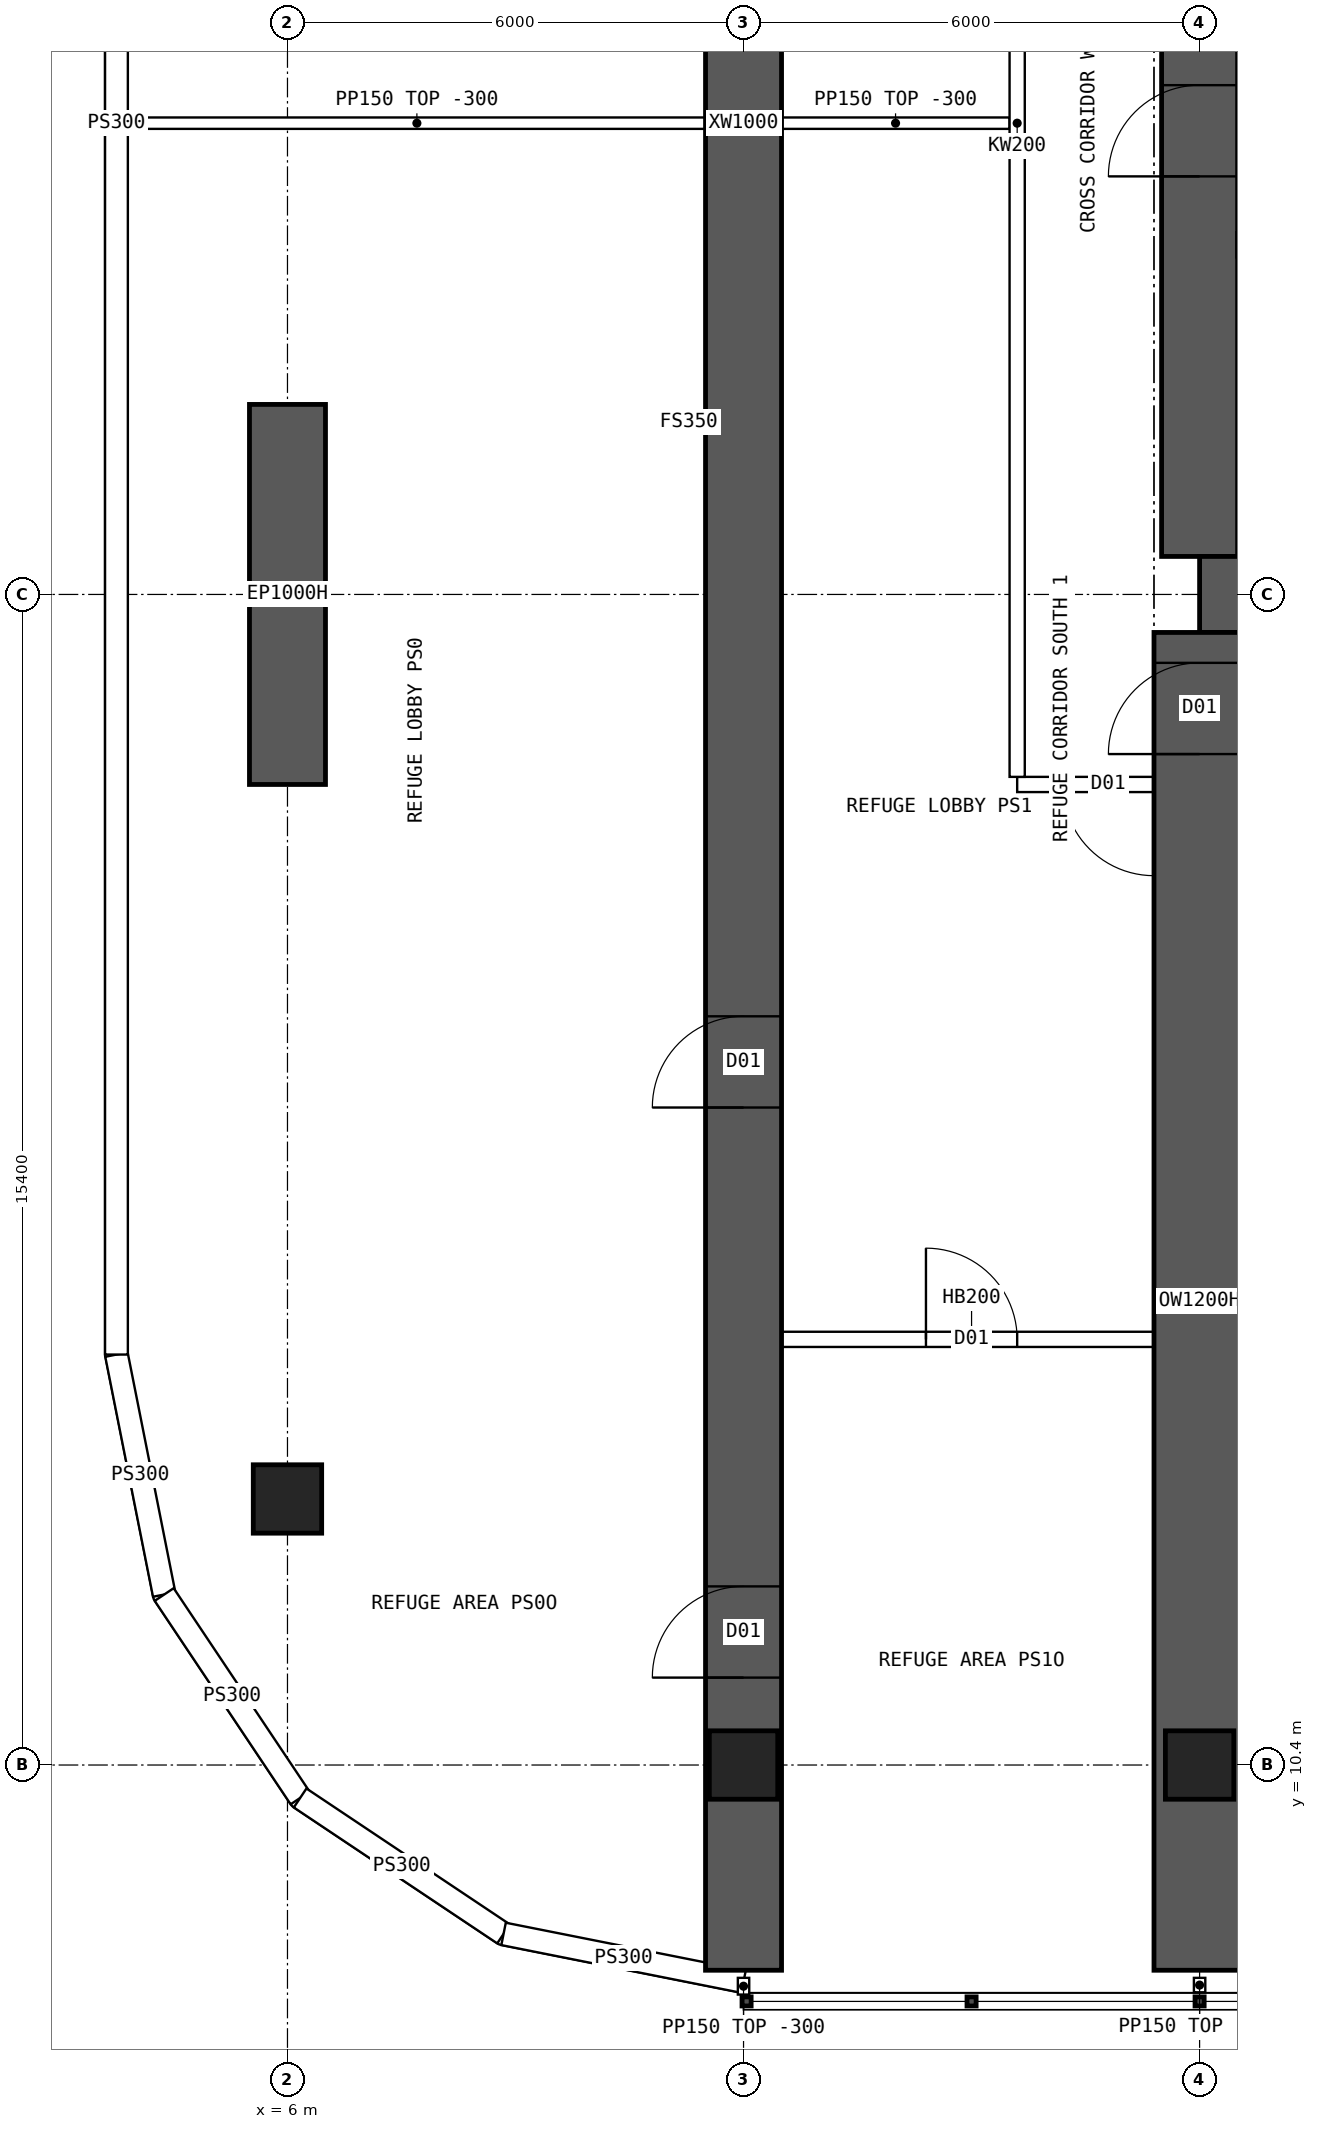
"""IFC4 building model, lengths in metres.
Left out: names, types, materials, properties, quantities, classifications, styles, units other than length and angle.
Written with IfcOpenShell. Run it as: python <this file> out.ifc"""

import sys

from ifc_helpers import new_model, si_unit, direction, frame, frame_2d, origin, origin_2d, place, context, subcontext, project, spatial, polyline, rectangle, hollow_rectangle, outline, extrude, element, fill, save


model = new_model("IFC4")
c1 = context("Model", 3, precision=1e-05, world=origin(), true_north=direction((0.0, 1.0)))
c2 = subcontext(c1, "Body", "Model", "MODEL_VIEW")
j1 = project(units=[si_unit("LENGTHUNIT", "METRE"), si_unit("PLANEANGLEUNIT", "RADIAN")], contexts=[c1])
p1 = place(None, origin())
s1 = spatial("IfcSite", under=j1, at=p1, CompositionType="ELEMENT")
p2 = place(p1, origin())
s2 = spatial("IfcBuilding", under=s1, at=p2, CompositionType="ELEMENT")
p3 = place(p2, frame((0.0, 0.0, 68.95)))
s3 = spatial("IfcBuildingStorey", under=s2, at=p3, CompositionType="ELEMENT", Elevation=68.95)
for number, where, z_axis, x_axis in (
    (1, (12.0, 10.4, 0.0), (0.0, 0.0, 1.0), (1.0, 0.0, 0.0)),
    (2, (18.0, 10.4, 0.0), (0.0, 0.0, 1.0), (1.0, 0.0, 0.0)),
    (3, (6.0, 13.9, 0.0), (0.0, 0.0, 1.0), (1.0, 0.0, 0.0)),
):
    element("IfcColumn", number, at=place(p3, frame(where, z_axis=z_axis, x_axis=x_axis)), inside=s3, PredefinedType="COLUMN", context=c2, shape_type="SweptSolid", body=[
        extrude(hollow_rectangle(XDim=0.9, YDim=0.9, WallThickness=0.09, at=origin_2d()), origin(), (0.0, 0.0, 1.0), 7.2),
    ])
p4 = place(p3, frame((6.0, 23.3, 0.0), z_axis=(0.0, 0.0, 1.0), x_axis=(0.0, 1.0, 0.0)))
e4 = element("IfcWall", 4, at=p4, inside=s3, PredefinedType="SHEAR", context=c2, shape_type="SweptSolid", body=[
    extrude(rectangle(XDim=5.0, YDim=1.0, at=frame_2d((2.5, 0.0))), origin(), (0.0, 0.0, 1.0), 7.2),
])
p5 = place(p3, frame((18.0, 25.8, 0.0), z_axis=(0.0, 0.0, 1.0), x_axis=(1.0, 0.0, 0.0)))
e5 = element("IfcWall", 5, at=p5, inside=s3, PredefinedType="SHEAR", context=c2, shape_type="SweptSolid", body=[
    extrude(rectangle(XDim=48.0, YDim=1.0, at=frame_2d((24.0, 0.0))), origin(), (0.0, 0.0, 1.0), 7.2),
])
p6 = place(p3, frame((18.0, 26.3, 0.0), z_axis=(0.0, 0.0, 1.0), x_axis=(0.0, 1.0, 0.0)))
e6 = element("IfcWall", 6, at=p6, inside=s3, PredefinedType="SHEAR", context=c2, shape_type="SweptSolid", body=[
    extrude(rectangle(XDim=11.4, YDim=1.0, at=frame_2d((5.7, 0.0))), origin(), (0.0, 0.0, 1.0), 7.2),
])
p7 = place(p6, frame((5.0, 0.0, 0.0)))
e7 = element("IfcOpeningElement", 7, at=p7, cuts=e6, PredefinedType="OPENING", context=c2, shape_type="SweptSolid", body=[
    extrude(rectangle(XDim=1.2, YDim=2.1, at=frame_2d((0.6, 1.05))), frame((0.0, 0.51, 0.0), z_axis=(0.0, -1.0, 0.0), x_axis=(1.0, 0.0, 0.0)), (0.0, 0.0, 1.0), 1.02),
])
p8 = place(p3, frame((12.0, 7.7, 0.0), z_axis=(0.0, 0.0, 1.0), x_axis=(0.0, 1.0, 0.0)))
e8 = element("IfcWall", 8, at=p8, inside=s3, PredefinedType="SHEAR", context=c2, shape_type="SweptSolid", body=[
    extrude(rectangle(XDim=48.6, YDim=1.0, at=frame_2d((24.3, 0.0))), origin(), (0.0, 0.0, 1.0), 7.2),
])
p9 = place(p8, frame((3.85, 0.0, 0.0)))
e9 = element("IfcOpeningElement", 9, at=p9, cuts=e8, PredefinedType="OPENING", context=c2, shape_type="SweptSolid", body=[
    extrude(rectangle(XDim=1.2, YDim=2.1, at=frame_2d((0.6, 1.05))), frame((0.0, 0.51, 0.0), z_axis=(0.0, -1.0, 0.0), x_axis=(1.0, 0.0, 0.0)), (0.0, 0.0, 1.0), 1.02),
])
p10 = place(p8, frame((11.35, 0.0, 0.0)))
e10 = element("IfcOpeningElement", 10, at=p10, cuts=e8, PredefinedType="OPENING", context=c2, shape_type="SweptSolid", body=[
    extrude(rectangle(XDim=1.2, YDim=2.1, at=frame_2d((0.6, 1.05))), frame((0.0, 0.51, 0.0), z_axis=(0.0, -1.0, 0.0), x_axis=(1.0, 0.0, 0.0)), (0.0, 0.0, 1.0), 1.02),
])
p11 = place(p8, frame((43.55, 0.0, 0.0)))
e11 = element("IfcOpeningElement", 11, at=p11, cuts=e8, PredefinedType="OPENING", context=c2, shape_type="SweptSolid", body=[
    extrude(rectangle(XDim=1.2, YDim=2.1, at=frame_2d((0.6, 1.05))), frame((0.0, 0.51, 0.0), z_axis=(0.0, -1.0, 0.0), x_axis=(1.0, 0.0, 0.0)), (0.0, 0.0, 1.0), 1.02),
])
p12 = place(p8, frame((36.05, 0.0, 0.0)))
e12 = element("IfcOpeningElement", 12, at=p12, cuts=e8, PredefinedType="OPENING", context=c2, shape_type="SweptSolid", body=[
    extrude(rectangle(XDim=1.2, YDim=2.1, at=frame_2d((0.6, 1.05))), frame((0.0, 0.51, 0.0), z_axis=(0.0, -1.0, 0.0), x_axis=(1.0, 0.0, 0.0)), (0.0, 0.0, 1.0), 1.02),
])
p13 = place(p3, frame((18.0, 7.7, 0.0), z_axis=(0.0, 0.0, 1.0), x_axis=(0.0, 1.0, 0.0)))
e13 = element("IfcWall", 13, at=p13, inside=s3, PredefinedType="SHEAR", context=c2, shape_type="SweptSolid", body=[
    extrude(rectangle(XDim=17.6, YDim=1.2, at=frame_2d((8.8, 0.0))), origin(), (0.0, 0.0, 1.0), 7.2),
])
p14 = place(p13, frame((16.0, 0.0, 0.0)))
e14 = element("IfcOpeningElement", 14, at=p14, cuts=e13, PredefinedType="OPENING", context=c2, shape_type="SweptSolid", body=[
    extrude(rectangle(XDim=1.2, YDim=2.1, at=frame_2d((0.6, 1.05))), frame((0.0, 0.61, 0.0), z_axis=(0.0, -1.0, 0.0), x_axis=(1.0, 0.0, 0.0)), (0.0, 0.0, 1.0), 1.22),
])
p15 = place(p3, frame((3.75, 48.2, 0.0), z_axis=(0.0, 0.0, 1.0), x_axis=(0.0, -1.0, 0.0)))
e15 = element("IfcWall", 15, at=p15, inside=s3, PredefinedType="SOLIDWALL", context=c2, shape_type="SweptSolid", body=[
    extrude(outline(polyline([(-0.015, -0.15), (32.415, -0.15), (32.385, 0.15), (0.015, 0.15), (-0.015, -0.15)])), origin(), (0.0, 0.0, 1.0), 6.9),
])
p16 = place(p3, frame((3.75, 15.8, 0.0), z_axis=(0.0, 0.0, 1.0), x_axis=(0.195065901187, -0.980790137692, 0.0)))
e16 = element("IfcWall", 16, at=p16, inside=s3, PredefinedType="SOLIDWALL", context=c2, shape_type="SweptSolid", body=[
    extrude(outline(polyline([(-0.015, -0.15), (3.249, -0.15), (3.189, 0.15), (0.015, 0.15), (-0.015, -0.15)])), origin(), (0.0, 0.0, 1.0), 6.9),
])
p17 = place(p3, frame((4.378, 12.643, 0.0), z_axis=(0.0, 0.0, 1.0), x_axis=(0.555609954424, -0.831443069936, 0.0)))
e17 = element("IfcWall", 17, at=p17, inside=s3, PredefinedType="SOLIDWALL", context=c2, shape_type="SweptSolid", body=[
    extrude(outline(polyline([(-0.03, -0.15), (3.249, -0.15), (3.189, 0.15), (0.03, 0.15), (-0.03, -0.15)])), origin(), (0.0, 0.0, 1.0), 6.9),
])
p18 = place(p3, frame((6.167, 9.966, 0.0), z_axis=(0.0, 0.0, 1.0), x_axis=(0.831478105043, -0.555557522525, 0.0)))
e18 = element("IfcWall", 18, at=p18, inside=s3, PredefinedType="SOLIDWALL", context=c2, shape_type="SweptSolid", body=[
    extrude(outline(polyline([(-0.03, -0.15), (3.249, -0.15), (3.189, 0.15), (0.03, 0.15), (-0.03, -0.15)])), origin(), (0.0, 0.0, 1.0), 6.9),
])
p19 = place(p3, frame((8.843, 8.178, 0.0), z_axis=(0.0, 0.0, 1.0), x_axis=(0.980787251524, -0.195080412259, 0.0)))
e19 = element("IfcWall", 19, at=p19, inside=s3, PredefinedType="SOLIDWALL", context=c2, shape_type="SweptSolid", body=[
    extrude(outline(polyline([(-0.03, -0.15), (3.249, -0.15), (3.189, 0.15), (0.03, 0.15), (-0.03, -0.15)])), origin(), (0.0, 0.0, 1.0), 6.9),
])
p20 = place(p3, frame((68.4, 23.3, 0.0), z_axis=(0.0, 0.0, 1.0), x_axis=(-1.0, 0.0, 0.0)))
e20 = element("IfcWall", 20, at=p20, inside=s3, PredefinedType="SOLIDWALL", context=c2, shape_type="SweptSolid", body=[
    extrude(rectangle(XDim=52.8, YDim=0.2, at=frame_2d((26.4, 0.0))), origin(), (0.0, 0.0, 1.0), 6.9),
])
p21 = place(p20, frame((51.0, 0.0, 0.0)))
e21 = element("IfcOpeningElement", 21, at=p21, cuts=e20, PredefinedType="OPENING", context=c2, shape_type="SweptSolid", body=[
    extrude(rectangle(XDim=1.2, YDim=2.1, at=frame_2d((0.6, 1.05))), frame((0.0, 0.11, 0.0), z_axis=(0.0, -1.0, 0.0), x_axis=(1.0, 0.0, 0.0)), (0.0, 0.0, 1.0), 0.22),
])
p22 = place(p20, frame((48.1, 0.0, 0.0)))
e22 = element("IfcOpeningElement", 22, at=p22, cuts=e20, PredefinedType="OPENING", context=c2, shape_type="SweptSolid", body=[
    extrude(rectangle(XDim=1.2, YDim=2.1, at=frame_2d((0.6, 1.05))), frame((0.0, 0.11, 0.0), z_axis=(0.0, -1.0, 0.0), x_axis=(1.0, 0.0, 0.0)), (0.0, 0.0, 1.0), 0.22),
])
p23 = place(p20, frame((42.1, 0.0, 0.0)))
e23 = element("IfcOpeningElement", 23, at=p23, cuts=e20, PredefinedType="OPENING", context=c2, shape_type="SweptSolid", body=[
    extrude(rectangle(XDim=1.2, YDim=2.1, at=frame_2d((0.6, 1.05))), frame((0.0, 0.11, 0.0), z_axis=(0.0, -1.0, 0.0), x_axis=(1.0, 0.0, 0.0)), (0.0, 0.0, 1.0), 0.22),
])
p24 = place(p20, frame((36.1, 0.0, 0.0)))
e24 = element("IfcOpeningElement", 24, at=p24, cuts=e20, PredefinedType="OPENING", context=c2, shape_type="SweptSolid", body=[
    extrude(rectangle(XDim=1.2, YDim=2.1, at=frame_2d((0.6, 1.05))), frame((0.0, 0.11, 0.0), z_axis=(0.0, -1.0, 0.0), x_axis=(1.0, 0.0, 0.0)), (0.0, 0.0, 1.0), 0.22),
])
p25 = place(p20, frame((30.1, 0.0, 0.0)))
e25 = element("IfcOpeningElement", 25, at=p25, cuts=e20, PredefinedType="OPENING", context=c2, shape_type="SweptSolid", body=[
    extrude(rectangle(XDim=1.2, YDim=2.1, at=frame_2d((0.6, 1.05))), frame((0.0, 0.11, 0.0), z_axis=(0.0, -1.0, 0.0), x_axis=(1.0, 0.0, 0.0)), (0.0, 0.0, 1.0), 0.22),
])
p26 = place(p20, frame((24.1, 0.0, 0.0)))
e26 = element("IfcOpeningElement", 26, at=p26, cuts=e20, PredefinedType="OPENING", context=c2, shape_type="SweptSolid", body=[
    extrude(rectangle(XDim=1.2, YDim=2.1, at=frame_2d((0.6, 1.05))), frame((0.0, 0.11, 0.0), z_axis=(0.0, -1.0, 0.0), x_axis=(1.0, 0.0, 0.0)), (0.0, 0.0, 1.0), 0.22),
])
p27 = place(p20, frame((18.1, 0.0, 0.0)))
e27 = element("IfcOpeningElement", 27, at=p27, cuts=e20, PredefinedType="OPENING", context=c2, shape_type="SweptSolid", body=[
    extrude(rectangle(XDim=1.2, YDim=2.1, at=frame_2d((0.6, 1.05))), frame((0.0, 0.11, 0.0), z_axis=(0.0, -1.0, 0.0), x_axis=(1.0, 0.0, 0.0)), (0.0, 0.0, 1.0), 0.22),
])
p28 = place(p20, frame((12.1, 0.0, 0.0)))
e28 = element("IfcOpeningElement", 28, at=p28, cuts=e20, PredefinedType="OPENING", context=c2, shape_type="SweptSolid", body=[
    extrude(rectangle(XDim=1.2, YDim=2.1, at=frame_2d((0.6, 1.05))), frame((0.0, 0.11, 0.0), z_axis=(0.0, -1.0, 0.0), x_axis=(1.0, 0.0, 0.0)), (0.0, 0.0, 1.0), 0.22),
])
p29 = place(p20, frame((6.1, 0.0, 0.0)))
e29 = element("IfcOpeningElement", 29, at=p29, cuts=e20, PredefinedType="OPENING", context=c2, shape_type="SweptSolid", body=[
    extrude(rectangle(XDim=1.2, YDim=2.1, at=frame_2d((0.6, 1.05))), frame((0.0, 0.11, 0.0), z_axis=(0.0, -1.0, 0.0), x_axis=(1.0, 0.0, 0.0)), (0.0, 0.0, 1.0), 0.22),
])
p30 = place(p20, frame((0.1, 0.0, 0.0)))
e30 = element("IfcOpeningElement", 30, at=p30, cuts=e20, PredefinedType="OPENING", context=c2, shape_type="SweptSolid", body=[
    extrude(rectangle(XDim=1.2, YDim=2.1, at=frame_2d((0.6, 1.05))), frame((0.0, 0.11, 0.0), z_axis=(0.0, -1.0, 0.0), x_axis=(1.0, 0.0, 0.0)), (0.0, 0.0, 1.0), 0.22),
])
p31 = place(p3, frame((15.6, 23.4, 0.0), z_axis=(0.0, 0.0, 1.0), x_axis=(0.0, 1.0, 0.0)))
e31 = element("IfcWall", 31, at=p31, inside=s3, PredefinedType="SOLIDWALL", context=c2, shape_type="SweptSolid", body=[
    extrude(rectangle(XDim=17.2, YDim=0.2, at=frame_2d((8.6, 0.0))), origin(), (0.0, 0.0, 1.0), 6.9),
])
p32 = place(p3, frame((12.5, 16.0, 0.0), z_axis=(0.0, 0.0, 1.0), x_axis=(1.0, 0.0, 0.0)))
e32 = element("IfcWall", 32, at=p32, inside=s3, PredefinedType="SOLIDWALL", context=c2, shape_type="SweptSolid", body=[
    extrude(rectangle(XDim=5.0, YDim=0.2, at=frame_2d((2.5, 0.0))), origin(), (0.0, 0.0, 1.0), 6.9),
])
p33 = place(p32, frame((1.9, 0.0, 0.0)))
e33 = element("IfcOpeningElement", 33, at=p33, cuts=e32, PredefinedType="OPENING", context=c2, shape_type="SweptSolid", body=[
    extrude(rectangle(XDim=1.2, YDim=2.1, at=frame_2d((0.6, 1.05))), frame((0.0, 0.11, 0.0), z_axis=(0.0, -1.0, 0.0), x_axis=(1.0, 0.0, 0.0)), (0.0, 0.0, 1.0), 0.22),
])
p34 = place(p3, frame((3.905, 32.0, 0.0), z_axis=(0.0, 0.0, 1.0), x_axis=(1.0, 0.0, 0.0)))
e34 = element("IfcWall", 34, at=p34, inside=s3, PredefinedType="PARTITIONING", context=c2, shape_type="SweptSolid", body=[
    extrude(outline(polyline([(0.0, 0.0), (7.595, 0.0), (7.595, 6.9), (2.397, 6.9), (2.395, 6.45), (1.797, 6.45), (1.795, 6.9), (0.0, 6.9), (0.0, 0.0)])), frame((0.0, 0.075, 0.0), z_axis=(0.0, -1.0, 0.0), x_axis=(1.0, 0.0, 0.0)), (0.0, 0.0, 1.0), 0.15),
])
p35 = place(p3, frame((12.5, 32.0, 0.0), z_axis=(0.0, 0.0, 1.0), x_axis=(1.0, 0.0, 0.0)))
e35 = element("IfcWall", 35, at=p35, inside=s3, PredefinedType="PARTITIONING", context=c2, shape_type="SweptSolid", body=[
    extrude(rectangle(XDim=3.0, YDim=0.15, at=frame_2d((1.5, 0.0))), origin(), (0.0, 0.0, 1.0), 6.9),
])
p36 = place(p3, frame((12.0, 7.6, 0.0), z_axis=(0.0, 0.0, 1.0), x_axis=(0.0, -1.0, 0.0)))
e36 = element("IfcWall", 36, at=p36, inside=s3, PredefinedType="PARTITIONING", context=c2, shape_type="SweptSolid", body=[
    extrude(rectangle(XDim=0.22, YDim=0.15, at=frame_2d((0.11, 0.0))), origin(), (0.0, 0.0, 1.0), 6.9),
])
p37 = place(p3, frame((18.0, 7.6, 0.0), z_axis=(0.0, 0.0, 1.0), x_axis=(0.0, -1.0, 0.0)))
e37 = element("IfcWall", 37, at=p37, inside=s3, PredefinedType="PARTITIONING", context=c2, shape_type="SweptSolid", body=[
    extrude(rectangle(XDim=0.19, YDim=0.15, at=frame_2d((0.095, 0.0))), origin(), (0.0, 0.0, 1.0), 6.9),
])
p38 = place(p7, origin())
e38 = element("IfcDoor", 38, at=p38, inside=s3, OperationType="SINGLE_SWING_LEFT", PredefinedType="DOOR", context=c2, shape_type="SweptSolid", body=[
    extrude(rectangle(XDim=1.2, YDim=2.1, at=frame_2d((0.6, 1.05))), frame((0.0, 0.025, 0.0), z_axis=(0.0, -1.0, 0.0), x_axis=(1.0, 0.0, 0.0)), (0.0, 0.0, 1.0), 0.05),
])
fill(e7, e38)
p39 = place(p33, origin())
e39 = element("IfcDoor", 39, at=p39, inside=s3, OperationType="SINGLE_SWING_LEFT", PredefinedType="DOOR", context=c2, shape_type="SweptSolid", body=[
    extrude(rectangle(XDim=1.2, YDim=2.1, at=frame_2d((0.6, 1.05))), frame((0.0, 0.025, 0.0), z_axis=(0.0, -1.0, 0.0), x_axis=(1.0, 0.0, 0.0)), (0.0, 0.0, 1.0), 0.05),
])
fill(e33, e39)
p40 = place(p21, origin())
e40 = element("IfcDoor", 40, at=p40, inside=s3, OperationType="SINGLE_SWING_LEFT", PredefinedType="DOOR", context=c2, shape_type="SweptSolid", body=[
    extrude(rectangle(XDim=1.2, YDim=2.1, at=frame_2d((0.6, 1.05))), frame((0.0, 0.025, 0.0), z_axis=(0.0, -1.0, 0.0), x_axis=(1.0, 0.0, 0.0)), (0.0, 0.0, 1.0), 0.05),
])
fill(e21, e40)
p41 = place(p14, origin())
e41 = element("IfcDoor", 41, at=p41, inside=s3, OperationType="SINGLE_SWING_LEFT", PredefinedType="DOOR", context=c2, shape_type="SweptSolid", body=[
    extrude(rectangle(XDim=1.2, YDim=2.1, at=frame_2d((0.6, 1.05))), frame((0.0, 0.025, 0.0), z_axis=(0.0, -1.0, 0.0), x_axis=(1.0, 0.0, 0.0)), (0.0, 0.0, 1.0), 0.05),
])
fill(e14, e41)
p42 = place(p9, origin())
e42 = element("IfcDoor", 42, at=p42, inside=s3, OperationType="SINGLE_SWING_LEFT", PredefinedType="DOOR", context=c2, shape_type="SweptSolid", body=[
    extrude(rectangle(XDim=1.2, YDim=2.1, at=frame_2d((0.6, 1.05))), frame((0.0, 0.485, 0.0), z_axis=(0.0, -1.0, 0.0), x_axis=(1.0, 0.0, 0.0)), (0.0, 0.0, 1.0), 0.05),
])
fill(e9, e42)
p43 = place(p10, origin())
e43 = element("IfcDoor", 43, at=p43, inside=s3, OperationType="SINGLE_SWING_LEFT", PredefinedType="DOOR", context=c2, shape_type="SweptSolid", body=[
    extrude(rectangle(XDim=1.2, YDim=2.1, at=frame_2d((0.6, 1.05))), frame((0.0, 0.485, 0.0), z_axis=(0.0, -1.0, 0.0), x_axis=(1.0, 0.0, 0.0)), (0.0, 0.0, 1.0), 0.05),
])
fill(e10, e43)
save(model, sys.argv[1])
